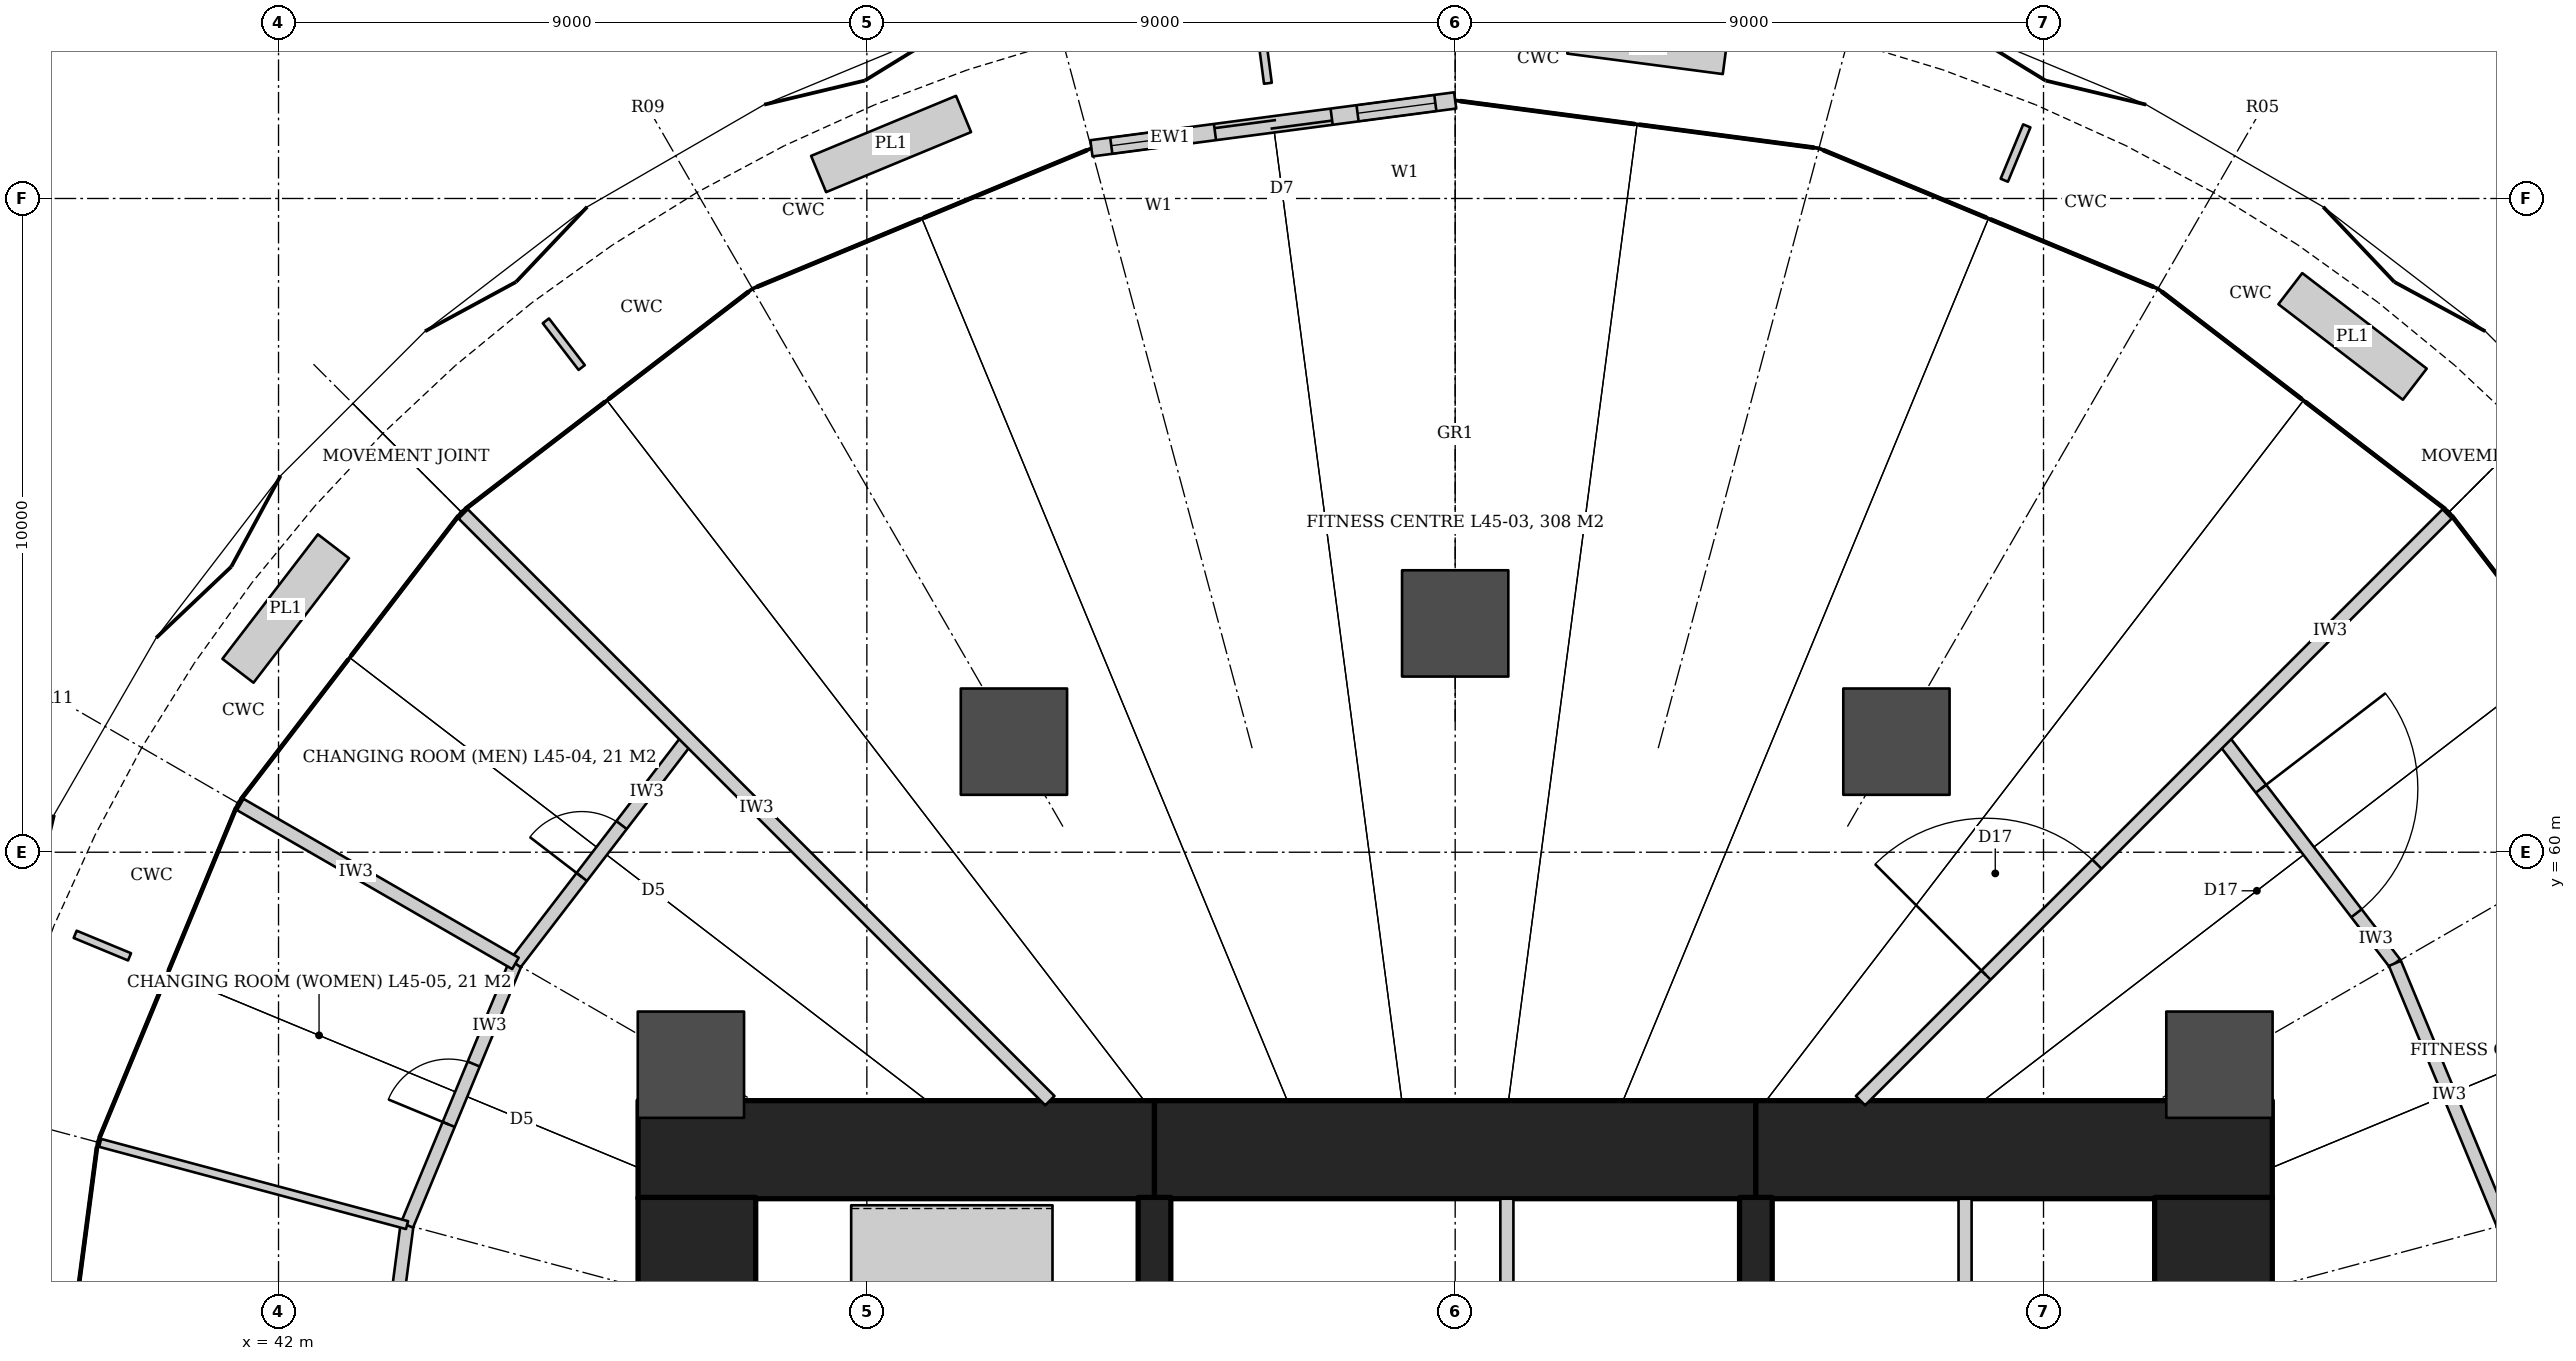
"""IFC4 building model, lengths in metres.
Left out: names, types, materials, properties, quantities, classifications, styles, units other than length and angle.
Written with IfcOpenShell. Run it as: python <this file> out.ifc"""

import sys

from ifc_helpers import new_model, si_unit, direction, frame, frame_2d, origin, origin_2d, place, context, subcontext, project, spatial, rectangle, hollow_circle, extrude, element, fill, save


model = new_model("IFC4")
c1 = context("Model", 3, precision=1e-05, world=origin(), true_north=direction((0.0, 1.0)))
c2 = subcontext(c1, "Body", "Model", "MODEL_VIEW")
j1 = project(units=[si_unit("LENGTHUNIT", "METRE"), si_unit("PLANEANGLEUNIT", "RADIAN")], contexts=[c1])
p1 = place(None, origin())
s1 = spatial("IfcSite", under=j1, at=p1, CompositionType="ELEMENT")
p2 = place(p1, origin())
s2 = spatial("IfcBuilding", under=s1, at=p2, CompositionType="ELEMENT")
p3 = place(p2, frame((0.0, 0.0, 198.2)))
s3 = spatial("IfcBuildingStorey", under=s2, at=p3, CompositionType="ELEMENT", Elevation=198.2)
p4 = place(p3, frame((47.5, 55.45, 0.0), z_axis=(0.0, 0.0, 1.0), x_axis=(1.0, 0.0, 0.0)))
e1 = element("IfcWall", 1, at=p4, inside=s3, PredefinedType="SHEAR", context=c2, shape_type="SweptSolid", body=[
    extrude(rectangle(XDim=7.9, YDim=1.5, at=frame_2d((3.95, 0.0))), origin(), (0.0, 0.0, 1.0), 4.2),
])
p5 = place(p3, frame((55.4, 55.45, 0.0), z_axis=(0.0, 0.0, 1.0), x_axis=(1.0, 0.0, 0.0)))
e2 = element("IfcWall", 2, at=p5, inside=s3, PredefinedType="SHEAR", context=c2, shape_type="SweptSolid", body=[
    extrude(rectangle(XDim=9.2, YDim=1.5, at=frame_2d((4.6, 0.0))), origin(), (0.0, 0.0, 1.0), 4.2),
])
p6 = place(p3, frame((64.6, 55.45, 0.0), z_axis=(0.0, 0.0, 1.0), x_axis=(1.0, 0.0, 0.0)))
e3 = element("IfcWall", 3, at=p6, inside=s3, PredefinedType="SHEAR", context=c2, shape_type="SweptSolid", body=[
    extrude(rectangle(XDim=7.9, YDim=1.5, at=frame_2d((3.95, 0.0))), origin(), (0.0, 0.0, 1.0), 4.2),
])
for number, where, z_axis, x_axis in (
    (4, (71.6, 51.5, 0.0), (0.0, 0.0, 1.0), (0.0, 1.0, 0.0)),
    (5, (48.4, 51.5, 0.0), (0.0, 0.0, 1.0), (0.0, 1.0, 0.0)),
):
    element("IfcWall", number, at=place(p3, frame(where, z_axis=z_axis, x_axis=x_axis)), inside=s3, PredefinedType="SHEAR", context=c2, shape_type="SweptSolid", body=[
        extrude(rectangle(XDim=3.22, YDim=1.8, at=frame_2d((1.61, 0.0))), origin(), (0.0, 0.0, 1.0), 4.2),
    ])
for number, where, z_axis, x_axis in (
    (6, (55.4, 51.73, 0.0), (0.0, 0.0, 1.0), (0.0, 1.0, 0.0)),
    (7, (64.6, 51.73, 0.0), (0.0, 0.0, 1.0), (0.0, 1.0, 0.0)),
):
    element("IfcWall", number, at=place(p3, frame(where, z_axis=z_axis, x_axis=x_axis)), inside=s3, PredefinedType="SHEAR", context=c2, shape_type="SweptSolid", body=[
        extrude(rectangle(XDim=2.99, YDim=0.5, at=frame_2d((1.495, 0.0))), origin(), (0.0, 0.0, 1.0), 4.2),
    ])
for number, where, z_axis, x_axis in (
    (8, (71.691, 56.75, 0.0), (0.0, 0.0, 1.0), (1.0, 0.0, 0.0)),
    (9, (66.75, 61.691, 0.0), (0.0, 0.0, 1.0), (1.0, 0.0, 0.0)),
    (10, (60.0, 63.5, 0.0), (0.0, 0.0, 1.0), (1.0, 0.0, 0.0)),
    (11, (53.25, 61.691, 0.0), (0.0, 0.0, 1.0), (1.0, 0.0, 0.0)),
    (12, (48.309, 56.75, 0.0), (0.0, 0.0, 1.0), (1.0, 0.0, 0.0)),
):
    element("IfcColumn", number, at=place(p3, frame(where, z_axis=z_axis, x_axis=x_axis)), inside=s3, PredefinedType="COLUMN", context=c2, shape_type="SweptSolid", body=[
        extrude(hollow_circle(Radius=0.813, WallThickness=0.08, at=origin_2d()), origin(), (0.0, 0.0, 1.0), 4.2),
    ])
p7 = place(p3, frame((43.4, 50.0, 0.0), z_axis=(0.0, 0.0, 1.0), x_axis=(0.130536124221, 0.99144355375, 0.0)))
e13 = element("IfcWall", 13, at=p7, inside=s3, PredefinedType="PARTITIONING", context=c2, shape_type="SweptSolid", body=[
    extrude(rectangle(XDim=4.333, YDim=0.2, at=frame_2d((2.167, 0.0))), origin(), (0.0, 0.0, 1.0), 3.012),
])
p8 = place(p3, frame((43.966, 54.296, 0.0), z_axis=(0.0, 0.0, 1.0), x_axis=(0.382698425325, 0.923873322082, 0.0)))
e14 = element("IfcWall", 14, at=p8, inside=s3, PredefinedType="PARTITIONING", context=c2, shape_type="SweptSolid", body=[
    extrude(rectangle(XDim=4.333, YDim=0.2, at=frame_2d((2.167, 0.0))), origin(), (0.0, 0.0, 1.0), 3.012),
])
p9 = place(p8, frame((1.667, 0.0, 0.0)))
e15 = element("IfcOpeningElement", 15, at=p9, cuts=e14, PredefinedType="OPENING", context=c2, shape_type="SweptSolid", body=[
    extrude(rectangle(XDim=1.0, YDim=2.1, at=frame_2d((0.5, 1.05))), frame((0.0, 0.11, 0.0), z_axis=(0.0, -1.0, 0.0), x_axis=(1.0, 0.0, 0.0)), (0.0, 0.0, 1.0), 0.22),
])
p10 = place(p3, frame((45.624, 58.3, 0.0), z_axis=(0.0, 0.0, 1.0), x_axis=(0.60874374674, 0.79336690806, 0.0)))
e16 = element("IfcWall", 16, at=p10, inside=s3, PredefinedType="PARTITIONING", context=c2, shape_type="SweptSolid", body=[
    extrude(rectangle(XDim=4.333, YDim=0.2, at=frame_2d((2.167, 0.0))), origin(), (0.0, 0.0, 1.0), 3.012),
])
p11 = place(p10, frame((1.667, 0.0, 0.0)))
e17 = element("IfcOpeningElement", 17, at=p11, cuts=e16, PredefinedType="OPENING", context=c2, shape_type="SweptSolid", body=[
    extrude(rectangle(XDim=1.0, YDim=2.1, at=frame_2d((0.5, 1.05))), frame((0.0, 0.11, 0.0), z_axis=(0.0, -1.0, 0.0), x_axis=(1.0, 0.0, 0.0)), (0.0, 0.0, 1.0), 0.22),
])
p12 = place(p3, frame((71.738, 61.738, 0.0), z_axis=(0.0, 0.0, 1.0), x_axis=(0.60874374674, -0.79336690806, 0.0)))
e18 = element("IfcWall", 18, at=p12, inside=s3, PredefinedType="PARTITIONING", context=c2, shape_type="SweptSolid", body=[
    extrude(rectangle(XDim=4.333, YDim=0.2, at=frame_2d((2.167, 0.0))), origin(), (0.0, 0.0, 1.0), 3.012),
])
p13 = place(p12, frame((0.967, 0.0, 0.0)))
e19 = element("IfcOpeningElement", 19, at=p13, cuts=e18, PredefinedType="OPENING", context=c2, shape_type="SweptSolid", body=[
    extrude(rectangle(XDim=2.4, YDim=2.4, at=frame_2d((1.2, 1.2))), frame((0.0, 0.11, 0.0), z_axis=(0.0, -1.0, 0.0), x_axis=(1.0, 0.0, 0.0)), (0.0, 0.0, 1.0), 0.22),
])
p14 = place(p3, frame((74.376, 58.3, 0.0), z_axis=(0.0, 0.0, 1.0), x_axis=(0.382698425325, -0.923873322082, 0.0)))
e20 = element("IfcWall", 20, at=p14, inside=s3, PredefinedType="PARTITIONING", context=c2, shape_type="SweptSolid", body=[
    extrude(rectangle(XDim=4.333, YDim=0.2, at=frame_2d((2.167, 0.0))), origin(), (0.0, 0.0, 1.0), 3.012),
])
p15 = place(p3, frame((66.2, 56.2, 0.0), z_axis=(0.0, 0.0, 1.0), x_axis=(0.707106781187, 0.707106781187, 0.0)))
e21 = element("IfcWall", 21, at=p15, inside=s3, PredefinedType="PARTITIONING", context=c2, shape_type="SweptSolid", body=[
    extrude(rectangle(XDim=12.692, YDim=0.2, at=frame_2d((6.346, 0.0))), origin(), (0.0, 0.0, 1.0), 3.02),
])
p16 = place(p15, frame((2.716, 0.0, 0.0)))
e22 = element("IfcOpeningElement", 22, at=p16, cuts=e21, PredefinedType="OPENING", context=c2, shape_type="SweptSolid", body=[
    extrude(rectangle(XDim=2.4, YDim=2.4, at=frame_2d((1.2, 1.2))), frame((0.0, 0.11, 0.0), z_axis=(0.0, -1.0, 0.0), x_axis=(1.0, 0.0, 0.0)), (0.0, 0.0, 1.0), 0.22),
])
p17 = place(p3, frame((53.8, 56.2, 0.0), z_axis=(0.0, 0.0, 1.0), x_axis=(-0.707106781187, 0.707106781187, 0.0)))
e23 = element("IfcWall", 23, at=p17, inside=s3, PredefinedType="PARTITIONING", context=c2, shape_type="SweptSolid", body=[
    extrude(rectangle(XDim=12.692, YDim=0.2, at=frame_2d((6.346, 0.0))), origin(), (0.0, 0.0, 1.0), 3.02),
])
p18 = place(p3, frame((45.624, 58.3, 0.0), z_axis=(0.0, 0.0, 1.0), x_axis=(-0.866036685051, 0.499980459763, 0.0)))
e24 = element("IfcWall", 24, at=p18, inside=s3, PredefinedType="PARTITIONING", context=c2, shape_type="SweptSolid", body=[
    extrude(rectangle(XDim=4.86, YDim=0.2, at=frame_2d((2.43, 0.0))), origin(), (0.0, 0.0, 1.0), 3.04),
])
p19 = place(p3, frame((43.966, 54.296, 0.0), z_axis=(0.0, 0.0, 1.0), x_axis=(-0.965927422152, 0.258813089189, 0.0)))
e25 = element("IfcWall", 25, at=p19, inside=s3, PredefinedType="PARTITIONING", context=c2, shape_type="SweptSolid", body=[
    extrude(rectangle(XDim=4.86, YDim=0.125, at=frame_2d((2.43, 0.0))), origin(), (0.0, 0.0, 1.0), 3.04),
])
p20 = place(p3, frame((60.0, 71.5, 0.0), z_axis=(0.0, 0.0, 1.0), x_axis=(-0.991443484334, -0.130536651449, 0.0)))
e26 = element("IfcWall", 26, at=p20, inside=s3, PredefinedType="SOLIDWALL", context=c2, shape_type="SweptSolid", body=[
    extrude(rectangle(XDim=5.613, YDim=0.25, at=frame_2d((2.806, 0.0))), origin(), (0.0, 0.0, 1.0), 4.04),
])
p21 = place(p20, frame((1.906, 0.0, 0.0)))
e27 = element("IfcOpeningElement", 27, at=p21, cuts=e26, PredefinedType="OPENING", context=c2, shape_type="SweptSolid", body=[
    extrude(rectangle(XDim=1.8, YDim=2.4, at=frame_2d((0.9, 1.2))), frame((0.0, 0.135, 0.0), z_axis=(0.0, -1.0, 0.0), x_axis=(1.0, 0.0, 0.0)), (0.0, 0.0, 1.0), 0.27),
])
p22 = place(p20, frame((0.306, 0.0, 0.0)))
e28 = element("IfcOpeningElement", 28, at=p22, cuts=e26, PredefinedType="OPENING", context=c2, shape_type="SweptSolid", body=[
    extrude(rectangle(XDim=1.2, YDim=2.4, at=frame_2d((0.6, 1.2))), frame((0.0, 0.135, 0.0), z_axis=(0.0, -1.0, 0.0), x_axis=(1.0, 0.0, 0.0)), (0.0, 0.0, 1.0), 0.27),
])
p23 = place(p20, frame((4.106, 0.0, 0.0)))
e29 = element("IfcOpeningElement", 29, at=p23, cuts=e26, PredefinedType="OPENING", context=c2, shape_type="SweptSolid", body=[
    extrude(rectangle(XDim=1.2, YDim=2.4, at=frame_2d((0.6, 1.2))), frame((0.0, 0.135, 0.0), z_axis=(0.0, -1.0, 0.0), x_axis=(1.0, 0.0, 0.0)), (0.0, 0.0, 1.0), 0.27),
])
p24 = place(p3, frame((67.8, 51.75, 0.0), z_axis=(0.0, 0.0, 1.0), x_axis=(0.0, 1.0, 0.0)))
e30 = element("IfcWall", 30, at=p24, inside=s3, PredefinedType="PARTITIONING", context=c2, shape_type="SweptSolid", body=[
    extrude(rectangle(XDim=2.95, YDim=0.2, at=frame_2d((1.475, 0.0))), origin(), (0.0, 0.0, 1.0), 4.2),
])
p25 = place(p3, frame((60.791, 51.75, 0.0), z_axis=(0.0, 0.0, 1.0), x_axis=(0.0, 1.0, 0.0)))
e31 = element("IfcWall", 31, at=p25, inside=s3, PredefinedType="PARTITIONING", context=c2, shape_type="SweptSolid", body=[
    extrude(rectangle(XDim=2.95, YDim=0.2, at=frame_2d((1.475, 0.0))), origin(), (0.0, 0.0, 1.0), 4.04),
])
p26 = place(p13, origin())
e32 = element("IfcDoor", 32, at=p26, inside=s3, OperationType="DOUBLE_DOOR_DOUBLE_SWING", PredefinedType="DOOR", context=c2, shape_type="SweptSolid", body=[
    extrude(rectangle(XDim=2.4, YDim=2.4, at=frame_2d((1.2, 1.2))), frame((0.0, 0.025, 0.0), z_axis=(0.0, -1.0, 0.0), x_axis=(1.0, 0.0, 0.0)), (0.0, 0.0, 1.0), 0.05),
])
fill(e19, e32)
p27 = place(p16, origin())
e33 = element("IfcDoor", 33, at=p27, inside=s3, OperationType="DOUBLE_DOOR_DOUBLE_SWING", PredefinedType="DOOR", context=c2, shape_type="SweptSolid", body=[
    extrude(rectangle(XDim=2.4, YDim=2.4, at=frame_2d((1.2, 1.2))), frame((0.0, 0.025, 0.0), z_axis=(0.0, -1.0, 0.0), x_axis=(1.0, 0.0, 0.0)), (0.0, 0.0, 1.0), 0.05),
])
fill(e22, e33)
p28 = place(p11, origin())
e34 = element("IfcDoor", 34, at=p28, inside=s3, OperationType="SINGLE_SWING_LEFT", PredefinedType="DOOR", context=c2, shape_type="SweptSolid", body=[
    extrude(rectangle(XDim=1.0, YDim=2.1, at=frame_2d((0.5, 1.05))), frame((0.0, 0.025, 0.0), z_axis=(0.0, -1.0, 0.0), x_axis=(1.0, 0.0, 0.0)), (0.0, 0.0, 1.0), 0.05),
])
fill(e17, e34)
p29 = place(p9, origin())
e35 = element("IfcDoor", 35, at=p29, inside=s3, OperationType="SINGLE_SWING_LEFT", PredefinedType="DOOR", context=c2, shape_type="SweptSolid", body=[
    extrude(rectangle(XDim=1.0, YDim=2.1, at=frame_2d((0.5, 1.05))), frame((0.0, 0.025, 0.0), z_axis=(0.0, -1.0, 0.0), x_axis=(1.0, 0.0, 0.0)), (0.0, 0.0, 1.0), 0.05),
])
fill(e15, e35)
p30 = place(p21, origin())
e36 = element("IfcDoor", 36, at=p30, inside=s3, OperationType="DOUBLE_DOOR_SLIDING", PredefinedType="DOOR", context=c2, shape_type="SweptSolid", body=[
    extrude(rectangle(XDim=1.8, YDim=2.4, at=frame_2d((0.9, 1.2))), frame((0.0, 0.025, 0.0), z_axis=(0.0, -1.0, 0.0), x_axis=(1.0, 0.0, 0.0)), (0.0, 0.0, 1.0), 0.05),
])
fill(e27, e36)
p31 = place(p22, origin())
e37 = element("IfcWindow", 37, at=p31, inside=s3, PartitioningType="SINGLE_PANEL", PredefinedType="WINDOW", context=c2, shape_type="SweptSolid", body=[
    extrude(rectangle(XDim=1.2, YDim=2.4, at=frame_2d((0.6, 1.2))), frame((0.0, 0.03, 0.0), z_axis=(0.0, -1.0, 0.0), x_axis=(1.0, 0.0, 0.0)), (0.0, 0.0, 1.0), 0.06),
])
fill(e28, e37)
p32 = place(p23, origin())
e38 = element("IfcWindow", 38, at=p32, inside=s3, PartitioningType="SINGLE_PANEL", PredefinedType="WINDOW", context=c2, shape_type="SweptSolid", body=[
    extrude(rectangle(XDim=1.2, YDim=2.4, at=frame_2d((0.6, 1.2))), frame((0.0, 0.03, 0.0), z_axis=(0.0, -1.0, 0.0), x_axis=(1.0, 0.0, 0.0)), (0.0, 0.0, 1.0), 0.06),
])
fill(e29, e38)
save(model, sys.argv[1])
